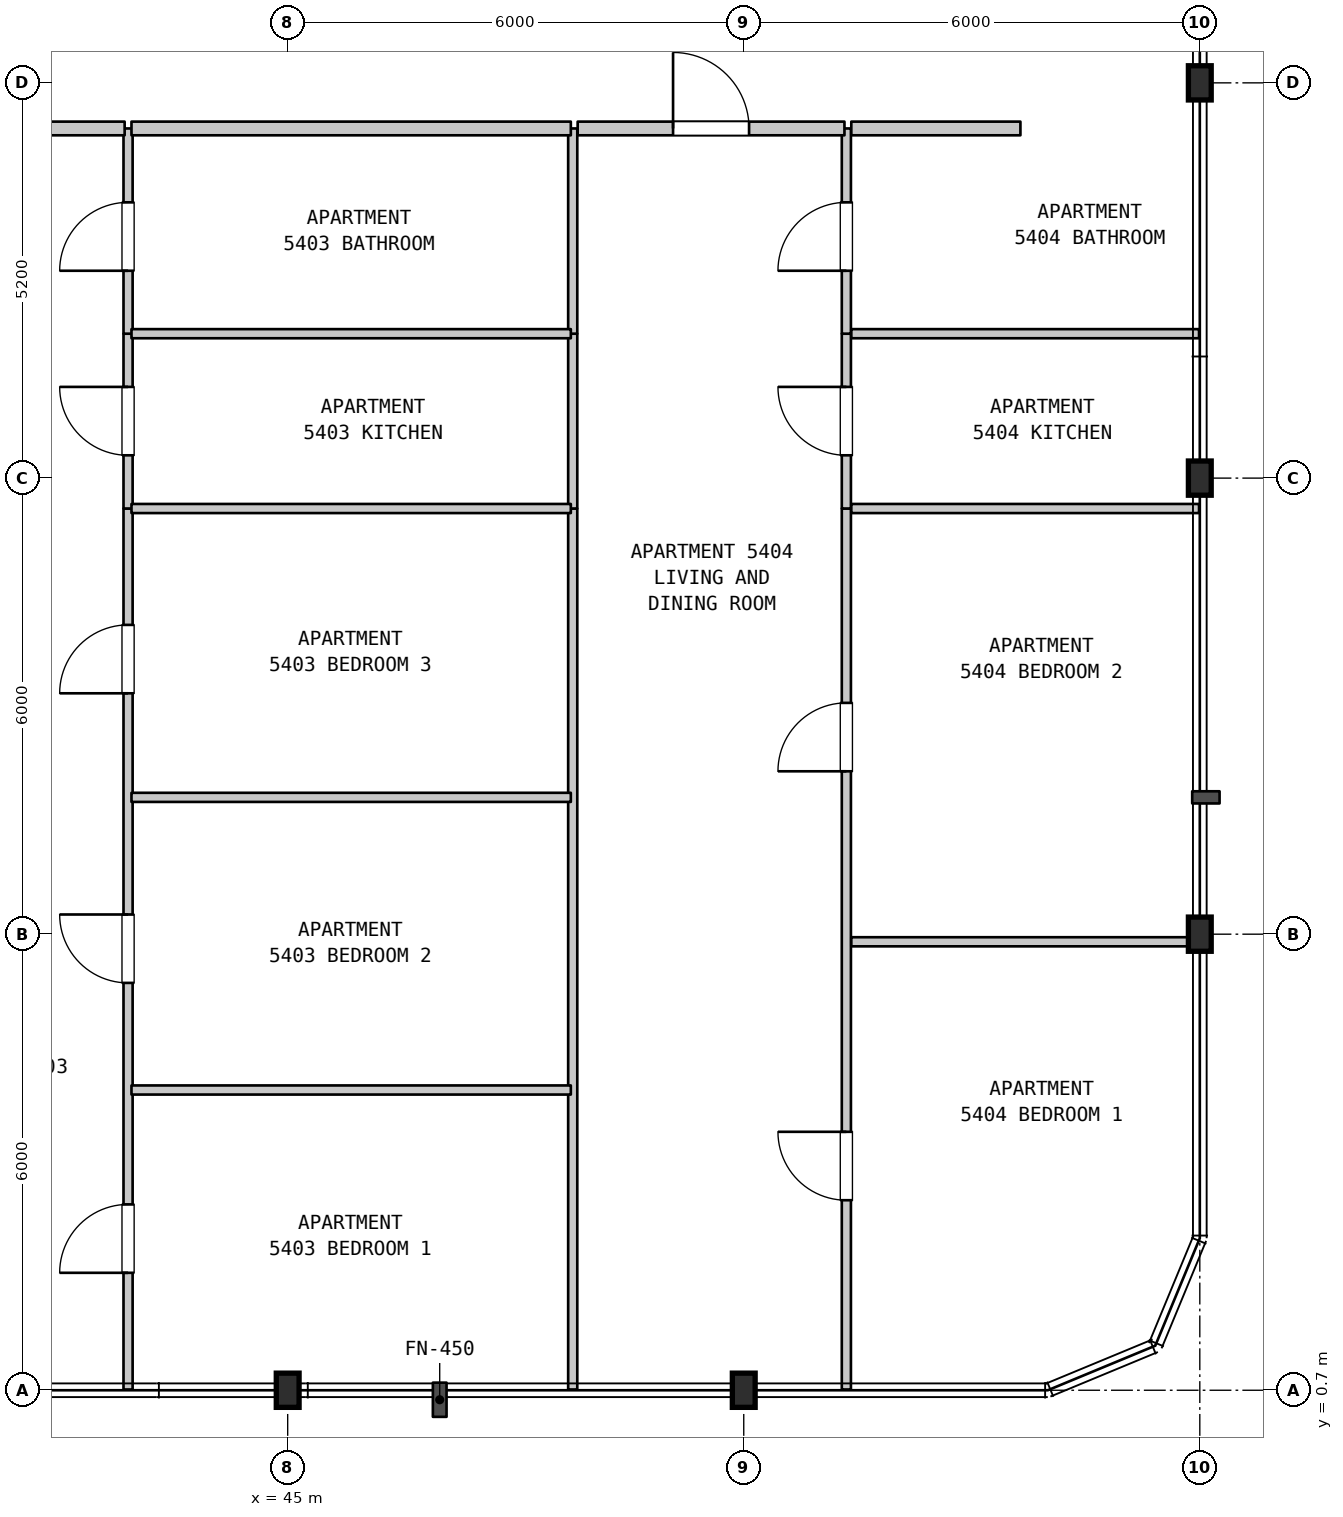
"""IFC4 building model, lengths in metres.
Left out: names, types, materials, properties, quantities, classifications, styles, units other than length and angle.
Written with IfcOpenShell. Run it as: python <this file> out.ifc"""

import sys

from ifc_helpers import new_model, si_unit, direction, frame, frame_2d, origin, origin_2d, place, context, subcontext, project, spatial, rectangle, i_section, extrude, element, fill, save


model = new_model("IFC4")
c1 = context("Model", 3, precision=1e-05, world=origin(), true_north=direction((0.0, 1.0)))
c2 = subcontext(c1, "Body", "Model", "MODEL_VIEW")
j1 = project(units=[si_unit("LENGTHUNIT", "METRE"), si_unit("PLANEANGLEUNIT", "RADIAN")], contexts=[c1])
p1 = place(None, origin())
s1 = spatial("IfcSite", under=j1, at=p1, CompositionType="ELEMENT")
p2 = place(p1, origin())
s2 = spatial("IfcBuilding", under=s1, at=p2, CompositionType="ELEMENT")
p3 = place(p2, frame((0.0, 0.0, 218.0)))
s3 = spatial("IfcBuildingStorey", under=s2, at=p3, CompositionType="ELEMENT", Elevation=218.0)
for number, where, z_axis, x_axis in (
    (1, (45.0, 0.7, 0.0), (0.0, 0.0, 1.0), (1.0, 0.0, 0.0)),
    (2, (51.0, 0.7, 0.0), (0.0, 0.0, 1.0), (1.0, 0.0, 0.0)),
    (3, (57.0, 6.7, 0.0), (0.0, 0.0, 1.0), (1.0, 0.0, 0.0)),
    (4, (57.0, 12.7, 0.0), (0.0, 0.0, 1.0), (1.0, 0.0, 0.0)),
    (5, (57.0, 17.9, 0.0), (0.0, 0.0, 1.0), (1.0, 0.0, 0.0)),
):
    element("IfcColumn", number, at=place(p3, frame(where, z_axis=z_axis, x_axis=x_axis)), inside=s3, PredefinedType="COLUMN", context=c2, shape_type="SweptSolid", body=[
        extrude(i_section(OverallWidth=0.3, OverallDepth=0.45, WebThickness=0.014, FlangeThickness=0.026, FilletRadius=0.027, at=origin_2d()), origin(), (0.0, 0.0, 1.0), 4.8),
    ])
p4 = place(p3, frame((42.9, 0.71, 0.0), z_axis=(0.0, 0.0, 1.0), x_axis=(0.0, 1.0, 0.0)))
e6 = element("IfcWall", 6, at=p4, inside=s3, PredefinedType="PARTITIONING", context=c2, shape_type="SweptSolid", body=[
    extrude(rectangle(XDim=11.59, YDim=0.12, at=frame_2d((5.795, 0.0))), origin(), (0.0, 0.0, 1.0), 4.49),
])
p5 = place(p4, frame((1.535, 0.0, 0.0)))
e7 = element("IfcOpeningElement", 7, at=p5, cuts=e6, PredefinedType="OPENING", context=c2, shape_type="SweptSolid", body=[
    extrude(rectangle(XDim=0.9, YDim=2.15, at=frame_2d((0.45, 1.075))), frame((0.0, 0.07, 0.0), z_axis=(0.0, -1.0, 0.0), x_axis=(1.0, 0.0, 0.0)), (0.0, 0.0, 1.0), 0.14),
])
p6 = place(p4, frame((5.349, 0.0, 0.0)))
e8 = element("IfcOpeningElement", 8, at=p6, cuts=e6, PredefinedType="OPENING", context=c2, shape_type="SweptSolid", body=[
    extrude(rectangle(XDim=0.9, YDim=2.15, at=frame_2d((0.45, 1.075))), frame((0.0, 0.07, 0.0), z_axis=(0.0, -1.0, 0.0), x_axis=(1.0, 0.0, 0.0)), (0.0, 0.0, 1.0), 0.14),
])
p7 = place(p4, frame((9.159, 0.0, 0.0)))
e9 = element("IfcOpeningElement", 9, at=p7, cuts=e6, PredefinedType="OPENING", context=c2, shape_type="SweptSolid", body=[
    extrude(rectangle(XDim=0.9, YDim=2.15, at=frame_2d((0.45, 1.075))), frame((0.0, 0.07, 0.0), z_axis=(0.0, -1.0, 0.0), x_axis=(1.0, 0.0, 0.0)), (0.0, 0.0, 1.0), 0.14),
])
p8 = place(p3, frame((42.9, 12.3, 0.0), z_axis=(0.0, 0.0, 1.0), x_axis=(0.0, 1.0, 0.0)))
e10 = element("IfcWall", 10, at=p8, inside=s3, PredefinedType="PARTITIONING", context=c2, shape_type="SweptSolid", body=[
    extrude(rectangle(XDim=2.3, YDim=0.12, at=frame_2d((1.15, 0.0))), origin(), (0.0, 0.0, 1.0), 4.49),
])
p9 = place(p8, frame((0.7, 0.0, 0.0)))
e11 = element("IfcOpeningElement", 11, at=p9, cuts=e10, PredefinedType="OPENING", context=c2, shape_type="SweptSolid", body=[
    extrude(rectangle(XDim=0.9, YDim=2.15, at=frame_2d((0.45, 1.075))), frame((0.0, 0.07, 0.0), z_axis=(0.0, -1.0, 0.0), x_axis=(1.0, 0.0, 0.0)), (0.0, 0.0, 1.0), 0.14),
])
p10 = place(p3, frame((42.9, 14.6, 0.0), z_axis=(0.0, 0.0, 1.0), x_axis=(0.0, 1.0, 0.0)))
e12 = element("IfcWall", 12, at=p10, inside=s3, PredefinedType="PARTITIONING", context=c2, shape_type="SweptSolid", body=[
    extrude(rectangle(XDim=2.7, YDim=0.12, at=frame_2d((1.35, 0.0))), origin(), (0.0, 0.0, 1.0), 4.49),
])
p11 = place(p10, frame((0.828, 0.0, 0.0)))
e13 = element("IfcOpeningElement", 13, at=p11, cuts=e12, PredefinedType="OPENING", context=c2, shape_type="SweptSolid", body=[
    extrude(rectangle(XDim=0.9, YDim=2.1, at=frame_2d((0.45, 1.05))), frame((0.0, 0.07, 0.0), z_axis=(0.0, -1.0, 0.0), x_axis=(1.0, 0.0, 0.0)), (0.0, 0.0, 1.0), 0.14),
])
p12 = place(p3, frame((48.75, 0.71, 0.0), z_axis=(0.0, 0.0, 1.0), x_axis=(0.0, 1.0, 0.0)))
e14 = element("IfcWall", 14, at=p12, inside=s3, PredefinedType="PARTITIONING", context=c2, shape_type="SweptSolid", body=[
    extrude(rectangle(XDim=11.59, YDim=0.12, at=frame_2d((5.795, 0.0))), origin(), (0.0, 0.0, 1.0), 4.49),
])
p13 = place(p3, frame((48.75, 12.3, 0.0), z_axis=(0.0, 0.0, 1.0), x_axis=(0.0, 1.0, 0.0)))
e15 = element("IfcWall", 15, at=p13, inside=s3, PredefinedType="PARTITIONING", context=c2, shape_type="SweptSolid", body=[
    extrude(rectangle(XDim=2.3, YDim=0.12, at=frame_2d((1.15, 0.0))), origin(), (0.0, 0.0, 1.0), 4.49),
])
p14 = place(p3, frame((48.75, 14.6, 0.0), z_axis=(0.0, 0.0, 1.0), x_axis=(0.0, 1.0, 0.0)))
e16 = element("IfcWall", 16, at=p14, inside=s3, PredefinedType="PARTITIONING", context=c2, shape_type="SweptSolid", body=[
    extrude(rectangle(XDim=2.7, YDim=0.12, at=frame_2d((1.35, 0.0))), origin(), (0.0, 0.0, 1.0), 4.49),
])
p15 = place(p3, frame((52.35, 0.71, 0.0), z_axis=(0.0, 0.0, 1.0), x_axis=(0.0, 1.0, 0.0)))
e17 = element("IfcWall", 17, at=p15, inside=s3, PredefinedType="PARTITIONING", context=c2, shape_type="SweptSolid", body=[
    extrude(rectangle(XDim=11.59, YDim=0.12, at=frame_2d((5.795, 0.0))), origin(), (0.0, 0.0, 1.0), 4.49),
])
p16 = place(p15, frame((2.49, 0.0, 0.0)))
e18 = element("IfcOpeningElement", 18, at=p16, cuts=e17, PredefinedType="OPENING", context=c2, shape_type="SweptSolid", body=[
    extrude(rectangle(XDim=0.9, YDim=2.15, at=frame_2d((0.45, 1.075))), frame((0.0, 0.07, 0.0), z_axis=(0.0, -1.0, 0.0), x_axis=(1.0, 0.0, 0.0)), (0.0, 0.0, 1.0), 0.14),
])
p17 = place(p15, frame((8.133, 0.0, 0.0)))
e19 = element("IfcOpeningElement", 19, at=p17, cuts=e17, PredefinedType="OPENING", context=c2, shape_type="SweptSolid", body=[
    extrude(rectangle(XDim=0.9, YDim=2.15, at=frame_2d((0.45, 1.075))), frame((0.0, 0.07, 0.0), z_axis=(0.0, -1.0, 0.0), x_axis=(1.0, 0.0, 0.0)), (0.0, 0.0, 1.0), 0.14),
])
p18 = place(p3, frame((52.35, 12.3, 0.0), z_axis=(0.0, 0.0, 1.0), x_axis=(0.0, 1.0, 0.0)))
e20 = element("IfcWall", 20, at=p18, inside=s3, PredefinedType="PARTITIONING", context=c2, shape_type="SweptSolid", body=[
    extrude(rectangle(XDim=2.3, YDim=0.12, at=frame_2d((1.15, 0.0))), origin(), (0.0, 0.0, 1.0), 4.49),
])
p19 = place(p18, frame((0.7, 0.0, 0.0)))
e21 = element("IfcOpeningElement", 21, at=p19, cuts=e20, PredefinedType="OPENING", context=c2, shape_type="SweptSolid", body=[
    extrude(rectangle(XDim=0.9, YDim=2.15, at=frame_2d((0.45, 1.075))), frame((0.0, 0.07, 0.0), z_axis=(0.0, -1.0, 0.0), x_axis=(1.0, 0.0, 0.0)), (0.0, 0.0, 1.0), 0.14),
])
p20 = place(p3, frame((52.35, 14.6, 0.0), z_axis=(0.0, 0.0, 1.0), x_axis=(0.0, 1.0, 0.0)))
e22 = element("IfcWall", 22, at=p20, inside=s3, PredefinedType="PARTITIONING", context=c2, shape_type="SweptSolid", body=[
    extrude(rectangle(XDim=2.7, YDim=0.12, at=frame_2d((1.35, 0.0))), origin(), (0.0, 0.0, 1.0), 4.49),
])
p21 = place(p20, frame((0.828, 0.0, 0.0)))
e23 = element("IfcOpeningElement", 23, at=p21, cuts=e22, PredefinedType="OPENING", context=c2, shape_type="SweptSolid", body=[
    extrude(rectangle(XDim=0.9, YDim=2.1, at=frame_2d((0.45, 1.05))), frame((0.0, 0.07, 0.0), z_axis=(0.0, -1.0, 0.0), x_axis=(1.0, 0.0, 0.0)), (0.0, 0.0, 1.0), 0.14),
])
p22 = place(p3, frame((42.945, 4.65, 0.0), z_axis=(0.0, 0.0, 1.0), x_axis=(1.0, 0.0, 0.0)))
e24 = element("IfcWall", 24, at=p22, inside=s3, PredefinedType="PARTITIONING", context=c2, shape_type="SweptSolid", body=[
    extrude(rectangle(XDim=5.78, YDim=0.12, at=frame_2d((2.89, 0.0))), origin(), (0.0, 0.0, 1.0), 4.49),
])
p23 = place(p3, frame((52.415, 6.6, 0.0), z_axis=(0.0, 0.0, 1.0), x_axis=(1.0, 0.0, 0.0)))
e25 = element("IfcWall", 25, at=p23, inside=s3, PredefinedType="PARTITIONING", context=c2, shape_type="SweptSolid", body=[
    extrude(rectangle(XDim=4.575, YDim=0.12, at=frame_2d((2.288, 0.0))), origin(), (0.0, 0.0, 1.0), 3.89),
])
for number, where, z_axis, x_axis in (
    (26, (42.945, 8.5, 0.0), (0.0, 0.0, 1.0), (1.0, 0.0, 0.0)),
    (27, (42.945, 12.3, 0.0), (0.0, 0.0, 1.0), (1.0, 0.0, 0.0)),
):
    element("IfcWall", number, at=place(p3, frame(where, z_axis=z_axis, x_axis=x_axis)), inside=s3, PredefinedType="PARTITIONING", context=c2, shape_type="SweptSolid", body=[
        extrude(rectangle(XDim=5.78, YDim=0.12, at=frame_2d((2.89, 0.0))), origin(), (0.0, 0.0, 1.0), 4.49),
    ])
p24 = place(p3, frame((52.415, 12.3, 0.0), z_axis=(0.0, 0.0, 1.0), x_axis=(1.0, 0.0, 0.0)))
e28 = element("IfcWall", 28, at=p24, inside=s3, PredefinedType="PARTITIONING", context=c2, shape_type="SweptSolid", body=[
    extrude(rectangle(XDim=4.575, YDim=0.12, at=frame_2d((2.288, 0.0))), origin(), (0.0, 0.0, 1.0), 4.49),
])
p25 = place(p3, frame((42.945, 14.6, 0.0), z_axis=(0.0, 0.0, 1.0), x_axis=(1.0, 0.0, 0.0)))
e29 = element("IfcWall", 29, at=p25, inside=s3, PredefinedType="PARTITIONING", context=c2, shape_type="SweptSolid", body=[
    extrude(rectangle(XDim=5.78, YDim=0.12, at=frame_2d((2.89, 0.0))), origin(), (0.0, 0.0, 1.0), 4.49),
])
p26 = place(p3, frame((52.415, 14.6, 0.0), z_axis=(0.0, 0.0, 1.0), x_axis=(1.0, 0.0, 0.0)))
e30 = element("IfcWall", 30, at=p26, inside=s3, PredefinedType="PARTITIONING", context=c2, shape_type="SweptSolid", body=[
    extrude(rectangle(XDim=4.575, YDim=0.12, at=frame_2d((2.288, 0.0))), origin(), (0.0, 0.0, 1.0), 4.49),
])
p27 = place(p3, frame((38.895, 17.3, 0.0), z_axis=(0.0, 0.0, 1.0), x_axis=(1.0, 0.0, 0.0)))
e31 = element("IfcWall", 31, at=p27, inside=s3, PredefinedType="STANDARD", context=c2, shape_type="SweptSolid", body=[
    extrude(rectangle(XDim=3.96, YDim=0.18, at=frame_2d((1.98, 0.0))), origin(), (0.0, 0.0, 1.0), 4.49),
])
p28 = place(p27, frame((1.609, 0.0, 0.0)))
e32 = element("IfcOpeningElement", 32, at=p28, cuts=e31, PredefinedType="OPENING", context=c2, shape_type="SweptSolid", body=[
    extrude(rectangle(XDim=1.0, YDim=2.15, at=frame_2d((0.5, 1.075))), frame((0.0, 0.1, 0.0), z_axis=(0.0, -1.0, 0.0), x_axis=(1.0, 0.0, 0.0)), (0.0, 0.0, 1.0), 0.2),
])
p29 = place(p3, frame((42.945, 17.3, 0.0), z_axis=(0.0, 0.0, 1.0), x_axis=(1.0, 0.0, 0.0)))
e33 = element("IfcWall", 33, at=p29, inside=s3, PredefinedType="STANDARD", context=c2, shape_type="SweptSolid", body=[
    extrude(rectangle(XDim=5.78, YDim=0.18, at=frame_2d((2.89, 0.0))), origin(), (0.0, 0.0, 1.0), 4.49),
])
p30 = place(p3, frame((48.815, 17.3, 0.0), z_axis=(0.0, 0.0, 1.0), x_axis=(1.0, 0.0, 0.0)))
e34 = element("IfcWall", 34, at=p30, inside=s3, PredefinedType="STANDARD", context=c2, shape_type="SweptSolid", body=[
    extrude(rectangle(XDim=3.51, YDim=0.18, at=frame_2d((1.755, 0.0))), origin(), (0.0, 0.0, 1.0), 4.49),
])
p31 = place(p30, frame((1.255, 0.0, 0.0)))
e35 = element("IfcOpeningElement", 35, at=p31, cuts=e34, PredefinedType="OPENING", context=c2, shape_type="SweptSolid", body=[
    extrude(rectangle(XDim=1.0, YDim=2.15, at=frame_2d((0.5, 1.075))), frame((0.0, 0.1, 0.0), z_axis=(0.0, -1.0, 0.0), x_axis=(1.0, 0.0, 0.0)), (0.0, 0.0, 1.0), 0.2),
])
p32 = place(p3, frame((52.415, 17.3, 0.0), z_axis=(0.0, 0.0, 1.0), x_axis=(1.0, 0.0, 0.0)))
e36 = element("IfcWall", 36, at=p32, inside=s3, PredefinedType="STANDARD", context=c2, shape_type="SweptSolid", body=[
    extrude(rectangle(XDim=2.225, YDim=0.18, at=frame_2d((1.112, 0.0))), origin(), (0.0, 0.0, 1.0), 4.49),
])
p33 = place(p5, origin())
e37 = element("IfcDoor", 37, at=p33, inside=s3, OperationType="SINGLE_SWING_LEFT", PredefinedType="DOOR", context=c2, shape_type="SweptSolid", body=[
    extrude(rectangle(XDim=0.9, YDim=2.15, at=frame_2d((0.45, 1.075))), frame((0.0, 0.025, 0.0), z_axis=(0.0, -1.0, 0.0), x_axis=(1.0, 0.0, 0.0)), (0.0, 0.0, 1.0), 0.05),
])
fill(e7, e37)
p34 = place(p6, origin())
e38 = element("IfcDoor", 38, at=p34, inside=s3, OperationType="SINGLE_SWING_RIGHT", PredefinedType="DOOR", context=c2, shape_type="SweptSolid", body=[
    extrude(rectangle(XDim=0.9, YDim=2.15, at=frame_2d((0.45, 1.075))), frame((0.0, 0.025, 0.0), z_axis=(0.0, -1.0, 0.0), x_axis=(1.0, 0.0, 0.0)), (0.0, 0.0, 1.0), 0.05),
])
fill(e8, e38)
p35 = place(p7, origin())
e39 = element("IfcDoor", 39, at=p35, inside=s3, OperationType="SINGLE_SWING_LEFT", PredefinedType="DOOR", context=c2, shape_type="SweptSolid", body=[
    extrude(rectangle(XDim=0.9, YDim=2.15, at=frame_2d((0.45, 1.075))), frame((0.0, 0.025, 0.0), z_axis=(0.0, -1.0, 0.0), x_axis=(1.0, 0.0, 0.0)), (0.0, 0.0, 1.0), 0.05),
])
fill(e9, e39)
p36 = place(p9, origin())
e40 = element("IfcDoor", 40, at=p36, inside=s3, OperationType="SINGLE_SWING_RIGHT", PredefinedType="DOOR", context=c2, shape_type="SweptSolid", body=[
    extrude(rectangle(XDim=0.9, YDim=2.15, at=frame_2d((0.45, 1.075))), frame((0.0, 0.025, 0.0), z_axis=(0.0, -1.0, 0.0), x_axis=(1.0, 0.0, 0.0)), (0.0, 0.0, 1.0), 0.05),
])
fill(e11, e40)
p37 = place(p11, origin())
e41 = element("IfcDoor", 41, at=p37, inside=s3, OperationType="SINGLE_SWING_LEFT", PredefinedType="DOOR", context=c2, shape_type="SweptSolid", body=[
    extrude(rectangle(XDim=0.9, YDim=2.1, at=frame_2d((0.45, 1.05))), frame((0.0, 0.025, 0.0), z_axis=(0.0, -1.0, 0.0), x_axis=(1.0, 0.0, 0.0)), (0.0, 0.0, 1.0), 0.05),
])
fill(e13, e41)
p38 = place(p16, origin())
e42 = element("IfcDoor", 42, at=p38, inside=s3, OperationType="SINGLE_SWING_RIGHT", PredefinedType="DOOR", context=c2, shape_type="SweptSolid", body=[
    extrude(rectangle(XDim=0.9, YDim=2.15, at=frame_2d((0.45, 1.075))), frame((0.0, 0.025, 0.0), z_axis=(0.0, -1.0, 0.0), x_axis=(1.0, 0.0, 0.0)), (0.0, 0.0, 1.0), 0.05),
])
fill(e18, e42)
p39 = place(p17, origin())
e43 = element("IfcDoor", 43, at=p39, inside=s3, OperationType="SINGLE_SWING_LEFT", PredefinedType="DOOR", context=c2, shape_type="SweptSolid", body=[
    extrude(rectangle(XDim=0.9, YDim=2.15, at=frame_2d((0.45, 1.075))), frame((0.0, 0.025, 0.0), z_axis=(0.0, -1.0, 0.0), x_axis=(1.0, 0.0, 0.0)), (0.0, 0.0, 1.0), 0.05),
])
fill(e19, e43)
p40 = place(p19, origin())
e44 = element("IfcDoor", 44, at=p40, inside=s3, OperationType="SINGLE_SWING_RIGHT", PredefinedType="DOOR", context=c2, shape_type="SweptSolid", body=[
    extrude(rectangle(XDim=0.9, YDim=2.15, at=frame_2d((0.45, 1.075))), frame((0.0, 0.025, 0.0), z_axis=(0.0, -1.0, 0.0), x_axis=(1.0, 0.0, 0.0)), (0.0, 0.0, 1.0), 0.05),
])
fill(e21, e44)
p41 = place(p21, origin())
e45 = element("IfcDoor", 45, at=p41, inside=s3, OperationType="SINGLE_SWING_LEFT", PredefinedType="DOOR", context=c2, shape_type="SweptSolid", body=[
    extrude(rectangle(XDim=0.9, YDim=2.1, at=frame_2d((0.45, 1.05))), frame((0.0, 0.025, 0.0), z_axis=(0.0, -1.0, 0.0), x_axis=(1.0, 0.0, 0.0)), (0.0, 0.0, 1.0), 0.05),
])
fill(e23, e45)
p42 = place(p31, origin())
e46 = element("IfcDoor", 46, at=p42, inside=s3, OperationType="SINGLE_SWING_LEFT", PredefinedType="DOOR", context=c2, shape_type="SweptSolid", body=[
    extrude(rectangle(XDim=1.0, YDim=2.15, at=frame_2d((0.5, 1.075))), frame((0.0, 0.025, 0.0), z_axis=(0.0, -1.0, 0.0), x_axis=(1.0, 0.0, 0.0)), (0.0, 0.0, 1.0), 0.05),
])
fill(e35, e46)
save(model, sys.argv[1])
